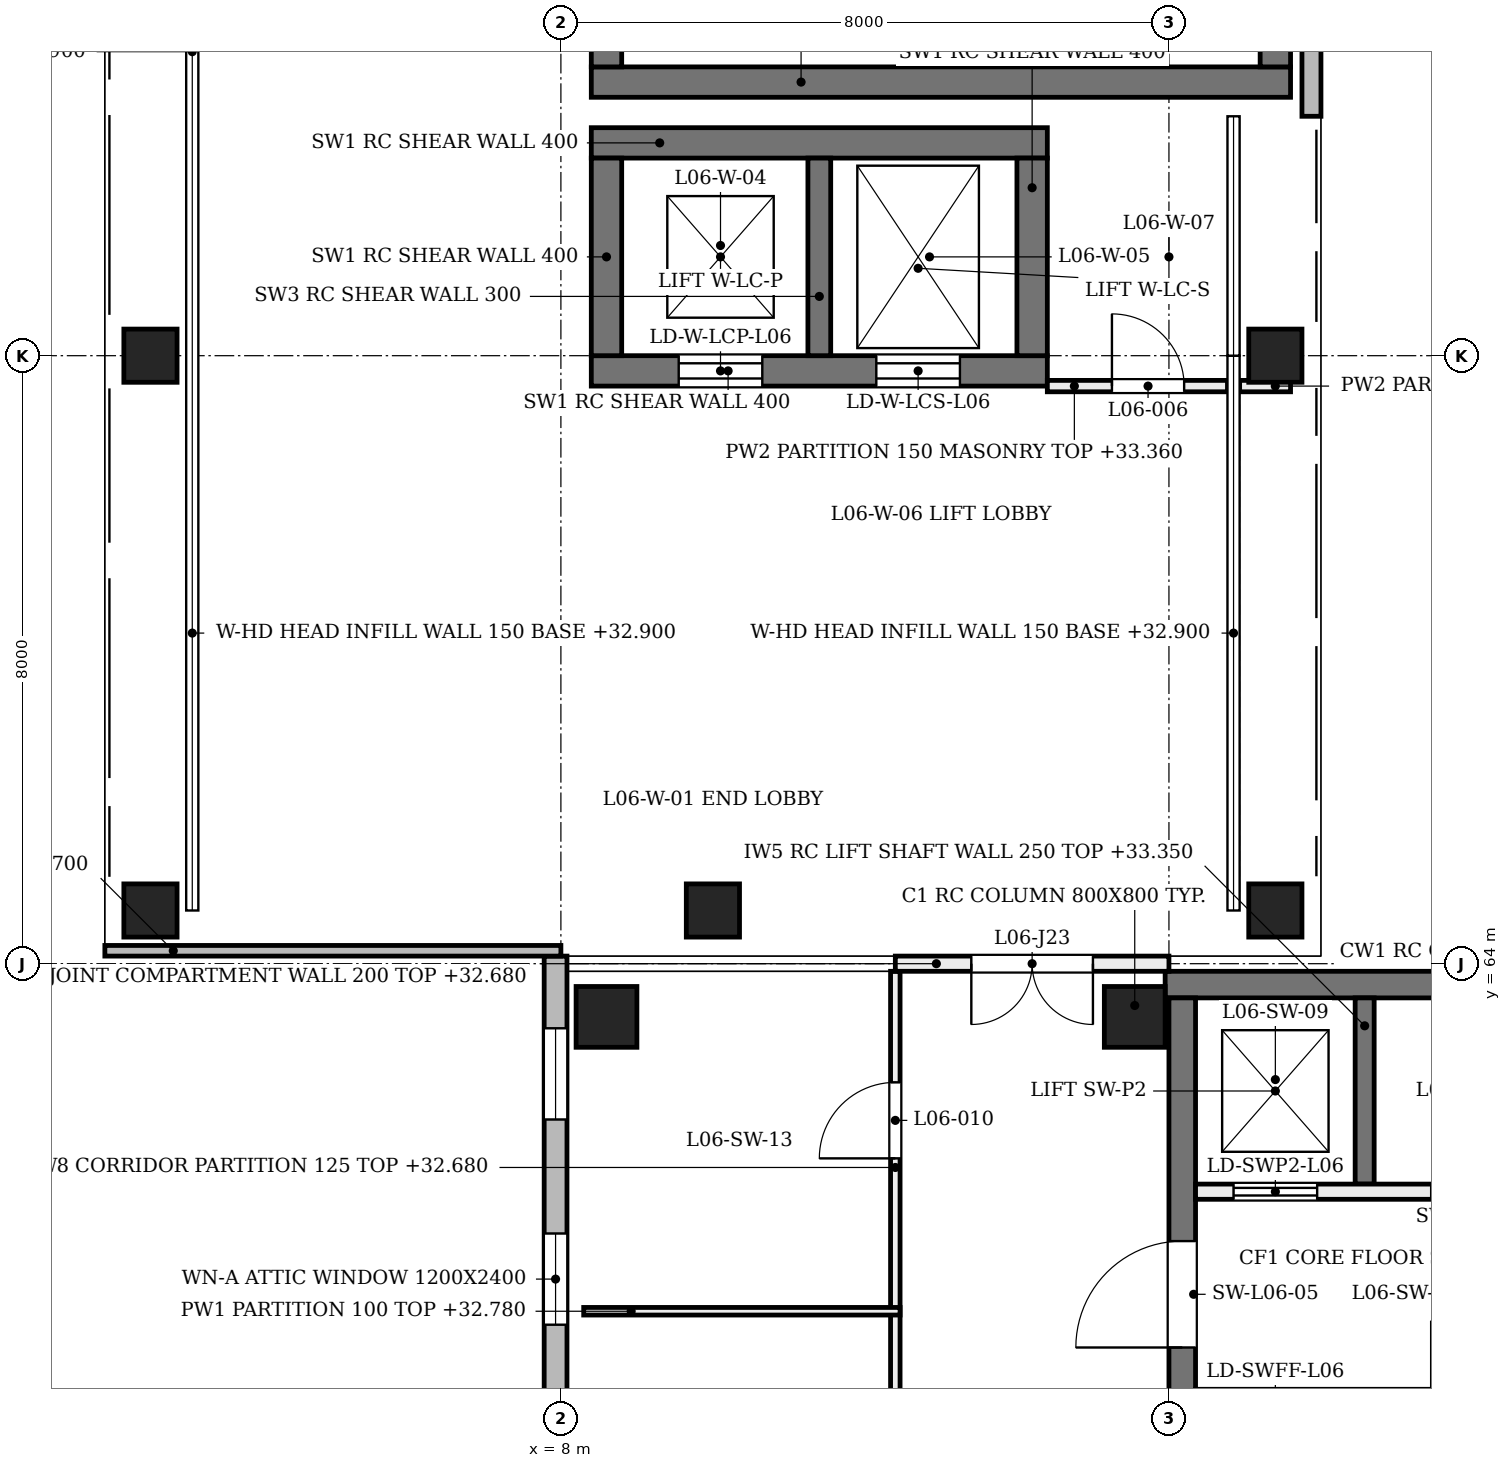
"""IFC4 building model, lengths in metres.
Left out: names, types, materials, properties, quantities, classifications, styles, units other than length and angle.
Written with IfcOpenShell. Run it as: python <this file> out.ifc"""

import sys

from ifc_helpers import new_model, si_unit, direction, frame, frame_2d, origin, origin_2d, place, context, subcontext, project, spatial, rectangle, extrude, element, fill, save


model = new_model("IFC4")
c1 = context("Model", 3, precision=1e-05, world=origin(), true_north=direction((0.0, 1.0)))
c2 = subcontext(c1, "Body", "Model", "MODEL_VIEW")
j1 = project(units=[si_unit("LENGTHUNIT", "METRE"), si_unit("PLANEANGLEUNIT", "RADIAN")], contexts=[c1])
p1 = place(None, origin())
s1 = spatial("IfcSite", under=j1, at=p1, CompositionType="ELEMENT")
p2 = place(p1, origin())
s2 = spatial("IfcBuilding", under=s1, at=p2, CompositionType="ELEMENT")
p3 = place(p2, frame((0.0, 0.0, 28.8)))
s3 = spatial("IfcBuildingStorey", under=s2, at=p3, CompositionType="ELEMENT", Elevation=28.8)
p4 = place(p3, frame((8.4, 71.8, 0.0), z_axis=(0.0, 0.0, 1.0), x_axis=(1.0, 0.0, 0.0)))
e1 = element("IfcWall", 1, at=p4, inside=s3, PredefinedType="SHEAR", context=c2, shape_type="SweptSolid", body=[
    extrude(rectangle(XDim=6.0, YDim=0.4, at=frame_2d((3.0, 0.0))), origin(), (0.0, 0.0, 1.0), 4.58),
])
p5 = place(p4, frame((1.15, 0.0, 0.0)))
e2 = element("IfcOpeningElement", 2, at=p5, cuts=e1, PredefinedType="OPENING", context=c2, shape_type="SweptSolid", body=[
    extrude(rectangle(XDim=1.1, YDim=2.1, at=frame_2d((0.55, 1.05))), frame((0.0, 0.21, 0.0), z_axis=(0.0, -1.0, 0.0), x_axis=(1.0, 0.0, 0.0)), (0.0, 0.0, 1.0), 0.42),
])
p6 = place(p4, frame((3.75, 0.0, 0.0)))
e3 = element("IfcOpeningElement", 3, at=p6, cuts=e1, PredefinedType="OPENING", context=c2, shape_type="SweptSolid", body=[
    extrude(rectangle(XDim=1.1, YDim=2.1, at=frame_2d((0.55, 1.05))), frame((0.0, 0.21, 0.0), z_axis=(0.0, -1.0, 0.0), x_axis=(1.0, 0.0, 0.0)), (0.0, 0.0, 1.0), 0.42),
])
p7 = place(p3, frame((8.4, 74.8, 0.0), z_axis=(0.0, 0.0, 1.0), x_axis=(1.0, 0.0, 0.0)))
e4 = element("IfcWall", 4, at=p7, inside=s3, PredefinedType="SHEAR", context=c2, shape_type="SweptSolid", body=[
    extrude(rectangle(XDim=6.0, YDim=0.4, at=frame_2d((3.0, 0.0))), origin(), (0.0, 0.0, 1.0), 4.58),
])
for number, where, z_axis, x_axis in (
    (5, (8.6, 72.0, 0.0), (0.0, 0.0, 1.0), (0.0, 1.0, 0.0)),
    (6, (14.2, 72.0, 0.0), (0.0, 0.0, 1.0), (0.0, 1.0, 0.0)),
):
    element("IfcWall", number, at=place(p3, frame(where, z_axis=z_axis, x_axis=x_axis)), inside=s3, PredefinedType="SHEAR", context=c2, shape_type="SweptSolid", body=[
        extrude(rectangle(XDim=2.6, YDim=0.4, at=frame_2d((1.3, 0.0))), origin(), (0.0, 0.0, 1.0), 4.58),
    ])
p8 = place(p3, frame((11.4, 72.0, 0.0), z_axis=(0.0, 0.0, 1.0), x_axis=(0.0, 1.0, 0.0)))
e7 = element("IfcWall", 7, at=p8, inside=s3, PredefinedType="SHEAR", context=c2, shape_type="SweptSolid", body=[
    extrude(rectangle(XDim=2.6, YDim=0.3, at=frame_2d((1.3, 0.0))), origin(), (0.0, 0.0, 1.0), 4.58),
])
p9 = place(p3, frame((8.4, 75.6, 0.0), z_axis=(0.0, 0.0, 1.0), x_axis=(1.0, 0.0, 0.0)))
e8 = element("IfcWall", 8, at=p9, inside=s3, PredefinedType="SHEAR", context=c2, shape_type="SweptSolid", body=[
    extrude(rectangle(XDim=9.2, YDim=0.4, at=frame_2d((4.6, 0.0))), origin(), (0.0, 0.0, 1.0), 4.58),
])
p10 = place(p3, frame((8.6, 75.8, 0.0), z_axis=(0.0, 0.0, 1.0), x_axis=(0.0, 1.0, 0.0)))
e9 = element("IfcWall", 9, at=p10, inside=s3, PredefinedType="SHEAR", context=c2, shape_type="SweptSolid", body=[
    extrude(rectangle(XDim=7.0, YDim=0.4, at=frame_2d((3.5, 0.0))), origin(), (0.0, 0.0, 1.0), 4.58),
])
p11 = place(p10, frame((2.974, 0.0, 0.0)))
e10 = element("IfcOpeningElement", 10, at=p11, cuts=e9, PredefinedType="OPENING", context=c2, shape_type="SweptSolid", body=[
    extrude(rectangle(XDim=1.25, YDim=2.1, at=frame_2d((0.625, 1.05))), frame((0.0, 0.21, 0.0), z_axis=(0.0, -1.0, 0.0), x_axis=(1.0, 0.0, 0.0)), (0.0, 0.0, 1.0), 0.42),
])
p12 = place(p3, frame((17.4, 75.8, 0.0), z_axis=(0.0, 0.0, 1.0), x_axis=(0.0, 1.0, 0.0)))
e11 = element("IfcWall", 11, at=p12, inside=s3, PredefinedType="SHEAR", context=c2, shape_type="SweptSolid", body=[
    extrude(rectangle(XDim=7.0, YDim=0.4, at=frame_2d((3.5, 0.0))), origin(), (0.0, 0.0, 1.0), 4.58),
])
p13 = place(p3, frame((15.95, 63.725, 0.0), z_axis=(0.0, 0.0, 1.0), x_axis=(1.0, 0.0, 0.0)))
e12 = element("IfcWall", 12, at=p13, inside=s3, PredefinedType="SHEAR", context=c2, shape_type="SweptSolid", body=[
    extrude(rectangle(XDim=7.95, YDim=0.35, at=frame_2d((3.975, 0.0))), origin(), (0.0, 0.0, 1.0), 4.58),
])
p14 = place(p3, frame((16.175, 48.35, 0.0), z_axis=(0.0, 0.0, 1.0), x_axis=(0.0, 1.0, 0.0)))
e13 = element("IfcWall", 13, at=p14, inside=s3, PredefinedType="SHEAR", context=c2, shape_type="SweptSolid", body=[
    extrude(rectangle(XDim=15.2, YDim=0.35, at=frame_2d((7.6, 0.0))), origin(), (0.0, 0.0, 1.0), 4.58),
])
p15 = place(p14, frame((0.95, 0.0, 0.0)))
e14 = element("IfcOpeningElement", 14, at=p15, cuts=e13, PredefinedType="OPENING", context=c2, shape_type="SweptSolid", body=[
    extrude(rectangle(XDim=1.0, YDim=2.1, at=frame_2d((0.5, 1.05))), frame((0.0, 0.185, 0.0), z_axis=(0.0, -1.0, 0.0), x_axis=(1.0, 0.0, 0.0)), (0.0, 0.0, 1.0), 0.37),
])
p16 = place(p14, frame((10.6, 0.0, 0.0)))
e15 = element("IfcOpeningElement", 15, at=p16, cuts=e13, PredefinedType="OPENING", context=c2, shape_type="SweptSolid", body=[
    extrude(rectangle(XDim=1.4, YDim=2.1, at=frame_2d((0.7, 1.05))), frame((0.0, 0.185, 0.0), z_axis=(0.0, -1.0, 0.0), x_axis=(1.0, 0.0, 0.0)), (0.0, 0.0, 1.0), 0.37),
])
for number, where, z_axis, x_axis in (
    (16, (8.6, 63.3, 0.0), (0.0, 0.0, 1.0), (1.0, 0.0, 0.0)),
    (17, (15.55, 63.3, 0.0), (0.0, 0.0, 1.0), (1.0, 0.0, 0.0)),
):
    element("IfcColumn", number, at=place(p3, frame(where, z_axis=z_axis, x_axis=x_axis)), inside=s3, PredefinedType="COLUMN", context=c2, shape_type="SweptSolid", body=[
        extrude(rectangle(XDim=0.8, YDim=0.8, at=origin_2d()), origin(), (0.0, 0.0, 1.0), 4.58),
    ])
for number, where, z_axis, x_axis in (
    (18, (2.6, 64.7, 0.0), (0.0, 0.0, 1.0), (1.0, 0.0, 0.0)),
    (19, (2.6, 72.0, 0.0), (0.0, 0.0, 1.0), (1.0, 0.0, 0.0)),
    (20, (10.0, 64.7, 0.0), (0.0, 0.0, 1.0), (1.0, 0.0, 0.0)),
    (21, (17.4, 64.7, 0.0), (0.0, 0.0, 1.0), (1.0, 0.0, 0.0)),
    (22, (17.4, 72.0, 0.0), (0.0, 0.0, 1.0), (1.0, 0.0, 0.0)),
):
    element("IfcColumn", number, at=place(p3, frame(where, z_axis=z_axis, x_axis=x_axis)), inside=s3, PredefinedType="COLUMN", context=c2, shape_type="SweptSolid", body=[
        extrude(rectangle(XDim=0.7, YDim=0.7, at=origin_2d()), origin(), (0.0, 0.0, 1.0), 4.58),
    ])
p17 = place(p3, frame((3.15, 64.9, 4.1), z_axis=(0.0, 0.0, 1.0), x_axis=(0.0, 1.0, 0.0)))
e23 = element("IfcWall", 23, at=p17, inside=s3, PredefinedType="SOLIDWALL", context=c2, shape_type="SweptSolid", body=[
    extrude(rectangle(XDim=6.9, YDim=0.15, at=frame_2d((3.45, 0.0))), origin(), (0.0, 0.0, 1.0), 0.48),
])
p18 = place(p3, frame((3.15, 72.2, 4.1), z_axis=(0.0, 0.0, 1.0), x_axis=(0.0, 1.0, 0.0)))
e24 = element("IfcWall", 24, at=p18, inside=s3, PredefinedType="SOLIDWALL", context=c2, shape_type="SweptSolid", body=[
    extrude(rectangle(XDim=7.6, YDim=0.15, at=frame_2d((3.8, 0.0))), origin(), (0.0, 0.0, 1.0), 0.48),
])
p19 = place(p3, frame((17.875, 75.15, 0.0), z_axis=(0.0, 0.0, 1.0), x_axis=(0.0, 1.0, 0.0)))
e25 = element("IfcWall", 25, at=p19, inside=s3, PredefinedType="SOLIDWALL", context=c2, shape_type="SweptSolid", body=[
    extrude(rectangle(XDim=8.3, YDim=0.25, at=frame_2d((4.15, 0.0))), origin(), (0.0, 0.0, 1.0), 3.9),
])
p20 = place(p3, frame((16.85, 64.9, 4.1), z_axis=(0.0, 0.0, 1.0), x_axis=(0.0, 1.0, 0.0)))
e26 = element("IfcWall", 26, at=p20, inside=s3, PredefinedType="SOLIDWALL", context=c2, shape_type="SweptSolid", body=[
    extrude(rectangle(XDim=6.9, YDim=0.15, at=frame_2d((3.45, 0.0))), origin(), (0.0, 0.0, 1.0), 0.48),
])
p21 = place(p3, frame((7.93, 47.7, 0.0), z_axis=(0.0, 0.0, 1.0), x_axis=(0.0, 1.0, 0.0)))
e27 = element("IfcWall", 27, at=p21, inside=s3, PredefinedType="SOLIDWALL", context=c2, shape_type="SweptSolid", body=[
    extrude(rectangle(XDim=16.4, YDim=0.3, at=frame_2d((8.2, 0.0))), origin(), (0.0, 0.0, 1.0), 3.9),
])
p22 = place(p21, frame((0.75, 0.0, 1.0)))
e28 = element("IfcOpeningElement", 28, at=p22, cuts=e27, PredefinedType="OPENING", context=c2, shape_type="SweptSolid", body=[
    extrude(rectangle(XDim=1.2, YDim=2.4, at=frame_2d((0.6, 1.2))), frame((0.0, 0.16, 0.0), z_axis=(0.0, -1.0, 0.0), x_axis=(1.0, 0.0, 0.0)), (0.0, 0.0, 1.0), 0.32),
])
p23 = place(p21, frame((3.45, 0.0, 1.0)))
e29 = element("IfcOpeningElement", 29, at=p23, cuts=e27, PredefinedType="OPENING", context=c2, shape_type="SweptSolid", body=[
    extrude(rectangle(XDim=1.2, YDim=2.4, at=frame_2d((0.6, 1.2))), frame((0.0, 0.16, 0.0), z_axis=(0.0, -1.0, 0.0), x_axis=(1.0, 0.0, 0.0)), (0.0, 0.0, 1.0), 0.32),
])
p24 = place(p21, frame((6.15, 0.0, 1.0)))
e30 = element("IfcOpeningElement", 30, at=p24, cuts=e27, PredefinedType="OPENING", context=c2, shape_type="SweptSolid", body=[
    extrude(rectangle(XDim=1.2, YDim=2.4, at=frame_2d((0.6, 1.2))), frame((0.0, 0.16, 0.0), z_axis=(0.0, -1.0, 0.0), x_axis=(1.0, 0.0, 0.0)), (0.0, 0.0, 1.0), 0.32),
])
p25 = place(p21, frame((8.85, 0.0, 1.0)))
e31 = element("IfcOpeningElement", 31, at=p25, cuts=e27, PredefinedType="OPENING", context=c2, shape_type="SweptSolid", body=[
    extrude(rectangle(XDim=1.2, YDim=2.4, at=frame_2d((0.6, 1.2))), frame((0.0, 0.16, 0.0), z_axis=(0.0, -1.0, 0.0), x_axis=(1.0, 0.0, 0.0)), (0.0, 0.0, 1.0), 0.32),
])
p26 = place(p21, frame((11.55, 0.0, 1.0)))
e32 = element("IfcOpeningElement", 32, at=p26, cuts=e27, PredefinedType="OPENING", context=c2, shape_type="SweptSolid", body=[
    extrude(rectangle(XDim=1.2, YDim=2.4, at=frame_2d((0.6, 1.2))), frame((0.0, 0.16, 0.0), z_axis=(0.0, -1.0, 0.0), x_axis=(1.0, 0.0, 0.0)), (0.0, 0.0, 1.0), 0.32),
])
p27 = place(p21, frame((14.25, 0.0, 1.0)))
e33 = element("IfcOpeningElement", 33, at=p27, cuts=e27, PredefinedType="OPENING", context=c2, shape_type="SweptSolid", body=[
    extrude(rectangle(XDim=1.2, YDim=2.4, at=frame_2d((0.6, 1.2))), frame((0.0, 0.16, 0.0), z_axis=(0.0, -1.0, 0.0), x_axis=(1.0, 0.0, 0.0)), (0.0, 0.0, 1.0), 0.32),
])
p28 = place(p3, frame((2.0, 64.17, 0.0), z_axis=(0.0, 0.0, 1.0), x_axis=(1.0, 0.0, 0.0)))
e34 = element("IfcWall", 34, at=p28, inside=s3, PredefinedType="SOLIDWALL", context=c2, shape_type="SweptSolid", body=[
    extrude(rectangle(XDim=6.0, YDim=0.14, at=frame_2d((3.0, 0.0))), origin(), (0.0, 0.0, 1.0), 3.9),
])
p29 = place(p3, frame((18.575, 61.1, 0.0), z_axis=(0.0, 0.0, 1.0), x_axis=(0.0, 1.0, 0.0)))
e35 = element("IfcWall", 35, at=p29, inside=s3, PredefinedType="SOLIDWALL", context=c2, shape_type="SweptSolid", body=[
    extrude(rectangle(XDim=2.45, YDim=0.25, at=frame_2d((1.225, 0.0))), origin(), (0.0, 0.0, 1.0), 4.55),
])
p30 = place(p3, frame((16.35, 61.0, 0.0), z_axis=(0.0, 0.0, 1.0), x_axis=(1.0, 0.0, 0.0)))
e36 = element("IfcWall", 36, at=p30, inside=s3, PredefinedType="SOLIDWALL", context=c2, shape_type="SweptSolid", body=[
    extrude(rectangle(XDim=7.2, YDim=0.2, at=frame_2d((3.6, 0.0))), origin(), (0.0, 0.0, 1.0), 4.55),
])
p31 = place(p30, frame((0.5, 0.0, 0.0)))
e37 = element("IfcOpeningElement", 37, at=p31, cuts=e36, PredefinedType="OPENING", context=c2, shape_type="SweptSolid", body=[
    extrude(rectangle(XDim=1.1, YDim=2.1, at=frame_2d((0.55, 1.05))), frame((0.0, 0.11, 0.0), z_axis=(0.0, -1.0, 0.0), x_axis=(1.0, 0.0, 0.0)), (0.0, 0.0, 1.0), 0.22),
])
p32 = place(p30, frame((5.6, 0.0, 0.0)))
e38 = element("IfcOpeningElement", 38, at=p32, cuts=e36, PredefinedType="OPENING", context=c2, shape_type="SweptSolid", body=[
    extrude(rectangle(XDim=1.1, YDim=2.1, at=frame_2d((0.55, 1.05))), frame((0.0, 0.11, 0.0), z_axis=(0.0, -1.0, 0.0), x_axis=(1.0, 0.0, 0.0)), (0.0, 0.0, 1.0), 0.22),
])
p33 = place(p30, frame((3.1, 0.0, 0.0)))
e39 = element("IfcOpeningElement", 39, at=p33, cuts=e36, PredefinedType="OPENING", context=c2, shape_type="SweptSolid", body=[
    extrude(rectangle(XDim=1.0, YDim=2.1, at=frame_2d((0.5, 1.05))), frame((0.0, 0.11, 0.0), z_axis=(0.0, -1.0, 0.0), x_axis=(1.0, 0.0, 0.0)), (0.0, 0.0, 1.0), 0.22),
])
p34 = place(p3, frame((14.4, 71.6, 0.0), z_axis=(0.0, 0.0, 1.0), x_axis=(1.0, 0.0, 0.0)))
e40 = element("IfcWall", 40, at=p34, inside=s3, PredefinedType="PARTITIONING", context=c2, shape_type="SweptSolid", body=[
    extrude(rectangle(XDim=2.37, YDim=0.15, at=frame_2d((1.185, 0.0))), origin(), (0.0, 0.0, 1.0), 4.56),
])
p35 = place(p34, frame((0.85, 0.0, 0.0)))
e41 = element("IfcOpeningElement", 41, at=p35, cuts=e40, PredefinedType="OPENING", context=c2, shape_type="SweptSolid", body=[
    extrude(rectangle(XDim=0.95, YDim=2.1, at=frame_2d((0.475, 1.05))), frame((0.0, 0.085, 0.0), z_axis=(0.0, -1.0, 0.0), x_axis=(1.0, 0.0, 0.0)), (0.0, 0.0, 1.0), 0.17),
])
p36 = place(p3, frame((16.93, 71.6, 0.0), z_axis=(0.0, 0.0, 1.0), x_axis=(1.0, 0.0, 0.0)))
e42 = element("IfcWall", 42, at=p36, inside=s3, PredefinedType="PARTITIONING", context=c2, shape_type="SweptSolid", body=[
    extrude(rectangle(XDim=0.67, YDim=0.15, at=frame_2d((0.335, 0.0))), origin(), (0.0, 0.0, 1.0), 4.08),
])
p37 = place(p3, frame((12.4, 55.296, 0.0), z_axis=(0.0, 0.0, 1.0), x_axis=(0.0, 1.0, 0.0)))
e43 = element("IfcWall", 43, at=p37, inside=s3, PredefinedType="PARTITIONING", context=c2, shape_type="SweptSolid", body=[
    extrude(rectangle(XDim=8.604, YDim=0.125, at=frame_2d((4.302, 0.0))), origin(), (0.0, 0.0, 1.0), 3.88),
])
p38 = place(p37, frame((1.809, 0.0, 0.0)))
e44 = element("IfcOpeningElement", 44, at=p38, cuts=e43, PredefinedType="OPENING", context=c2, shape_type="SweptSolid", body=[
    extrude(rectangle(XDim=1.0, YDim=2.1, at=frame_2d((0.5, 1.05))), frame((0.0, 0.073, 0.0), z_axis=(0.0, -1.0, 0.0), x_axis=(1.0, 0.0, 0.0)), (0.0, 0.0, 1.0), 0.145),
])
p39 = place(p37, frame((6.143, 0.0, 0.0)))
e45 = element("IfcOpeningElement", 45, at=p39, cuts=e43, PredefinedType="OPENING", context=c2, shape_type="SweptSolid", body=[
    extrude(rectangle(XDim=1.0, YDim=2.1, at=frame_2d((0.5, 1.05))), frame((0.0, 0.073, 0.0), z_axis=(0.0, -1.0, 0.0), x_axis=(1.0, 0.0, 0.0)), (0.0, 0.0, 1.0), 0.145),
])
p40 = place(p3, frame((8.3, 59.427, 0.0), z_axis=(0.0, 0.0, 1.0), x_axis=(1.0, 0.0, 0.0)))
e46 = element("IfcWall", 46, at=p40, inside=s3, PredefinedType="PARTITIONING", context=c2, shape_type="SweptSolid", body=[
    extrude(rectangle(XDim=4.162, YDim=0.1, at=frame_2d((2.081, 0.0))), origin(), (0.0, 0.0, 1.0), 3.98),
])
p41 = place(p3, frame((12.4, 64.0, 0.0), z_axis=(0.0, 0.0, 1.0), x_axis=(1.0, 0.0, 0.0)))
e47 = element("IfcWall", 47, at=p41, inside=s3, PredefinedType="PARTITIONING", context=c2, shape_type="SweptSolid", body=[
    extrude(rectangle(XDim=3.6, YDim=0.2, at=frame_2d((1.8, 0.0))), origin(), (0.0, 0.0, 1.0), 3.88),
])
p42 = place(p41, frame((1.0, 0.0, 0.0)))
e48 = element("IfcOpeningElement", 48, at=p42, cuts=e47, PredefinedType="OPENING", context=c2, shape_type="SweptSolid", body=[
    extrude(rectangle(XDim=1.6, YDim=2.1, at=frame_2d((0.8, 1.05))), frame((0.0, 0.11, 0.0), z_axis=(0.0, -1.0, 0.0), x_axis=(1.0, 0.0, 0.0)), (0.0, 0.0, 1.0), 0.22),
])
p43 = place(p26, origin())
e49 = element("IfcWindow", 49, at=p43, inside=s3, PartitioningType="SINGLE_PANEL", PredefinedType="WINDOW", context=c2, shape_type="SweptSolid", body=[
    extrude(rectangle(XDim=1.2, YDim=2.4, at=frame_2d((0.6, 1.2))), frame((0.0, 0.03, 0.0), z_axis=(0.0, -1.0, 0.0), x_axis=(1.0, 0.0, 0.0)), (0.0, 0.0, 1.0), 0.06),
])
fill(e32, e49)
p44 = place(p27, origin())
e50 = element("IfcWindow", 50, at=p44, inside=s3, PartitioningType="SINGLE_PANEL", PredefinedType="WINDOW", context=c2, shape_type="SweptSolid", body=[
    extrude(rectangle(XDim=1.2, YDim=2.4, at=frame_2d((0.6, 1.2))), frame((0.0, 0.03, 0.0), z_axis=(0.0, -1.0, 0.0), x_axis=(1.0, 0.0, 0.0)), (0.0, 0.0, 1.0), 0.06),
])
fill(e33, e50)
p45 = place(p31, frame((1.1, 0.0, 0.0), z_axis=(0.0, 0.0, 1.0), x_axis=(-1.0, 0.0, 0.0)))
e51 = element("IfcDoor", 51, at=p45, inside=s3, OperationType="DOUBLE_DOOR_SLIDING", PredefinedType="DOOR", context=c2, shape_type="SweptSolid", body=[
    extrude(rectangle(XDim=1.1, YDim=2.1, at=frame_2d((0.55, 1.05))), frame((0.0, 0.025, 0.0), z_axis=(0.0, -1.0, 0.0), x_axis=(1.0, 0.0, 0.0)), (0.0, 0.0, 1.0), 0.05),
])
fill(e37, e51)
p46 = place(p16, origin())
e52 = element("IfcDoor", 52, at=p46, inside=s3, OperationType="SINGLE_SWING_LEFT", PredefinedType="DOOR", context=c2, shape_type="SweptSolid", body=[
    extrude(rectangle(XDim=1.4, YDim=2.1, at=frame_2d((0.7, 1.05))), frame((0.0, 0.025, 0.0), z_axis=(0.0, -1.0, 0.0), x_axis=(1.0, 0.0, 0.0)), (0.0, 0.0, 1.0), 0.05),
])
fill(e15, e52)
p47 = place(p5, frame((1.1, 0.0, 0.0), z_axis=(0.0, 0.0, 1.0), x_axis=(-1.0, 0.0, 0.0)))
e53 = element("IfcDoor", 53, at=p47, inside=s3, OperationType="DOUBLE_DOOR_SLIDING", PredefinedType="DOOR", context=c2, shape_type="SweptSolid", body=[
    extrude(rectangle(XDim=1.1, YDim=2.1, at=frame_2d((0.55, 1.05))), frame((0.0, 0.025, 0.0), z_axis=(0.0, -1.0, 0.0), x_axis=(1.0, 0.0, 0.0)), (0.0, 0.0, 1.0), 0.05),
])
fill(e2, e53)
p48 = place(p6, frame((1.1, 0.0, 0.0), z_axis=(0.0, 0.0, 1.0), x_axis=(-1.0, 0.0, 0.0)))
e54 = element("IfcDoor", 54, at=p48, inside=s3, OperationType="DOUBLE_DOOR_SLIDING", PredefinedType="DOOR", context=c2, shape_type="SweptSolid", body=[
    extrude(rectangle(XDim=1.1, YDim=2.1, at=frame_2d((0.55, 1.05))), frame((0.0, 0.025, 0.0), z_axis=(0.0, -1.0, 0.0), x_axis=(1.0, 0.0, 0.0)), (0.0, 0.0, 1.0), 0.05),
])
fill(e3, e54)
p49 = place(p35, origin())
e55 = element("IfcDoor", 55, at=p49, inside=s3, OperationType="SINGLE_SWING_LEFT", PredefinedType="DOOR", context=c2, shape_type="SweptSolid", body=[
    extrude(rectangle(XDim=0.95, YDim=2.1, at=frame_2d((0.475, 1.05))), frame((0.0, 0.025, 0.0), z_axis=(0.0, -1.0, 0.0), x_axis=(1.0, 0.0, 0.0)), (0.0, 0.0, 1.0), 0.05),
])
fill(e41, e55)
p50 = place(p39, origin())
e56 = element("IfcDoor", 56, at=p50, inside=s3, OperationType="SINGLE_SWING_LEFT", PredefinedType="DOOR", context=c2, shape_type="SweptSolid", body=[
    extrude(rectangle(XDim=1.0, YDim=2.1, at=frame_2d((0.5, 1.05))), frame((0.0, 0.025, 0.0), z_axis=(0.0, -1.0, 0.0), x_axis=(1.0, 0.0, 0.0)), (0.0, 0.0, 1.0), 0.05),
])
fill(e45, e56)
p51 = place(p42, frame((1.6, 0.0, 0.0), z_axis=(0.0, 0.0, 1.0), x_axis=(-1.0, 0.0, 0.0)))
e57 = element("IfcDoor", 57, at=p51, inside=s3, OperationType="DOUBLE_DOOR_SINGLE_SWING", PredefinedType="DOOR", context=c2, shape_type="SweptSolid", body=[
    extrude(rectangle(XDim=1.6, YDim=2.1, at=frame_2d((0.8, 1.05))), frame((0.0, 0.025, 0.0), z_axis=(0.0, -1.0, 0.0), x_axis=(1.0, 0.0, 0.0)), (0.0, 0.0, 1.0), 0.05),
])
fill(e48, e57)
save(model, sys.argv[1])
